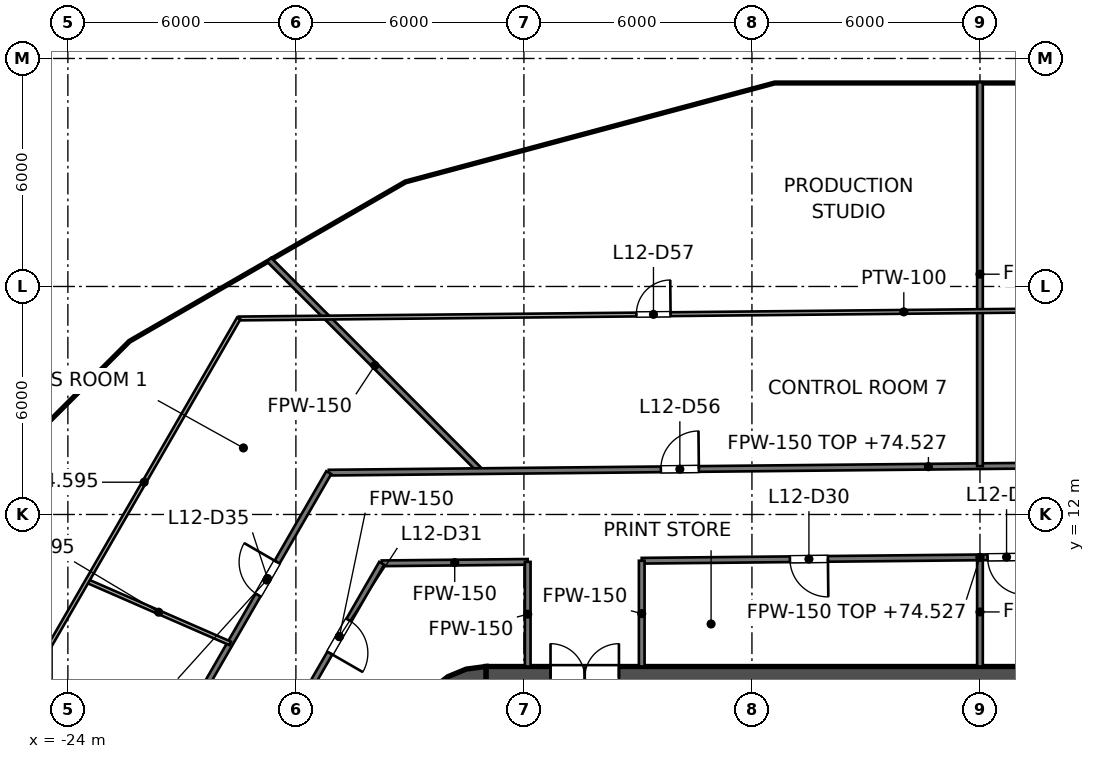
"""IFC4 building model, lengths in metres.
Left out: names, types, materials, properties, quantities, classifications, styles, units other than length and angle.
Written with IfcOpenShell. Run it as: python <this file> out.ifc"""

import sys

from ifc_helpers import new_model, si_unit, direction, frame, frame_2d, origin, place, context, subcontext, project, spatial, polyline, rectangle, outline, extrude, element, fill, save


model = new_model("IFC4")
c1 = context("Model", 3, precision=1e-05, world=origin(), true_north=direction((0.0, 1.0)))
c2 = subcontext(c1, "Body", "Model", "MODEL_VIEW")
j1 = project(units=[si_unit("LENGTHUNIT", "METRE"), si_unit("PLANEANGLEUNIT", "RADIAN")], contexts=[c1])
p1 = place(None, origin())
s1 = spatial("IfcSite", under=j1, at=p1, CompositionType="ELEMENT")
p2 = place(p1, origin())
s2 = spatial("IfcBuilding", under=s1, at=p2, CompositionType="ELEMENT")
p3 = place(p2, frame((0.0, 0.0, 71.4)))
s3 = spatial("IfcBuildingStorey", under=s2, at=p3, CompositionType="ELEMENT", Elevation=71.4)
p4 = place(p3, frame((-13.0, 7.7, 0.0), z_axis=(0.0, 0.0, 1.0), x_axis=(1.0, 0.0, 0.0)))
e1 = element("IfcWall", 1, at=p4, inside=s3, PredefinedType="SHEAR", context=c2, shape_type="SweptSolid", body=[
    extrude(rectangle(XDim=26.0, YDim=0.6, at=frame_2d((13.0, 0.0))), origin(), (0.0, 0.0, 1.0), 4.2),
])
p5 = place(p4, frame((1.7, 0.0, 0.0)))
e2 = element("IfcOpeningElement", 2, at=p5, cuts=e1, PredefinedType="OPENING", context=c2, shape_type="SweptSolid", body=[
    extrude(rectangle(XDim=1.8, YDim=2.1, at=frame_2d((0.9, 1.05))), frame((0.0, 0.3, 0.0), z_axis=(0.0, -1.0, 0.0), x_axis=(1.0, 0.0, 0.0)), (0.0, 0.0, 1.0), 0.6),
])
p6 = place(p4, frame((22.5, 0.0, 0.0)))
e3 = element("IfcOpeningElement", 3, at=p6, cuts=e1, PredefinedType="OPENING", context=c2, shape_type="SweptSolid", body=[
    extrude(rectangle(XDim=1.8, YDim=2.1, at=frame_2d((0.9, 1.05))), frame((0.0, 0.3, 0.0), z_axis=(0.0, -1.0, 0.0), x_axis=(1.0, 0.0, 0.0)), (0.0, 0.0, 1.0), 0.6),
])
p7 = place(p3, origin())
e4 = element("IfcWall", 4, at=p7, inside=s3, PredefinedType="SHEAR", context=c2, shape_type="SweptSolid", body=[
    extrude(outline(polyline([(-15.0, 6.0), (-14.395, 6.0), (-14.347, 6.361), (-14.208, 6.698), (-13.986, 6.986), (-13.698, 7.208), (-13.361, 7.347), (-13.0, 7.395), (-13.0, 8.0), (-13.518, 7.932), (-14.0, 7.732), (-14.414, 7.414), (-14.732, 7.0), (-14.932, 6.518), (-15.0, 6.0)])), origin(), (0.0, 0.0, 1.0), 4.2),
])
p8 = place(p3, frame((-18.703, 18.703, 0.0), z_axis=(0.0, 0.0, 1.0), x_axis=(0.707106781187, -0.707106781187, 0.0)))
e5 = element("IfcWall", 5, at=p8, inside=s3, PredefinedType="PARTITIONING", context=c2, shape_type="SweptSolid", body=[
    extrude(rectangle(XDim=7.865, YDim=0.15, at=frame_2d((3.933, 0.0))), origin(), (0.0, 0.0, 1.0), 3.195),
])
p9 = place(p3, frame((-15.742, 10.715, 0.0), z_axis=(0.0, 0.0, 1.0), x_axis=(0.999950870391, 0.009912456998, 0.0)))
e6 = element("IfcWall", 6, at=p9, inside=s3, PredefinedType="PARTITIONING", context=c2, shape_type="SweptSolid", body=[
    extrude(rectangle(XDim=3.842, YDim=0.15, at=frame_2d((1.921, 0.0))), origin(), (0.0, 0.0, 1.0), 3.195),
])
p10 = place(p3, frame((-8.9, 10.783, 0.0), z_axis=(0.0, 0.0, 1.0), x_axis=(0.999950697987, 0.009929833562, 0.0)))
e7 = element("IfcWall", 7, at=p10, inside=s3, PredefinedType="PARTITIONING", context=c2, shape_type="SweptSolid", body=[
    extrude(rectangle(XDim=17.801, YDim=0.15, at=frame_2d((8.9, 0.0))), origin(), (0.0, 0.0, 1.0), 3.127),
])
p11 = place(p10, frame((9.1, 0.0, 0.0)))
e8 = element("IfcOpeningElement", 8, at=p11, cuts=e7, PredefinedType="OPENING", context=c2, shape_type="SweptSolid", body=[
    extrude(rectangle(XDim=1.0, YDim=2.1, at=frame_2d((0.5, 1.05))), frame((0.0, 0.075, 0.0), z_axis=(0.0, -1.0, 0.0), x_axis=(1.0, 0.0, 0.0)), (0.0, 0.0, 1.0), 0.15),
])
p12 = place(p10, frame((3.9, 0.0, 0.0)))
e9 = element("IfcOpeningElement", 9, at=p12, cuts=e7, PredefinedType="OPENING", context=c2, shape_type="SweptSolid", body=[
    extrude(rectangle(XDim=1.0, YDim=2.1, at=frame_2d((0.5, 1.05))), frame((0.0, 0.075, 0.0), z_axis=(0.0, -1.0, 0.0), x_axis=(1.0, 0.0, 0.0)), (0.0, 0.0, 1.0), 0.15),
])
p13 = place(p3, frame((-17.135, 13.101, 0.0), z_axis=(0.0, 0.0, 1.0), x_axis=(0.999950742047, 0.009925395736, 0.0)))
e10 = element("IfcWall", 10, at=p13, inside=s3, PredefinedType="PARTITIONING", context=c2, shape_type="SweptSolid", body=[
    extrude(rectangle(XDim=31.559, YDim=0.15, at=frame_2d((15.779, 0.0))), origin(), (0.0, 0.0, 1.0), 3.127),
])
p14 = place(p13, frame((21.441, 0.0, 0.0)))
e11 = element("IfcOpeningElement", 11, at=p14, cuts=e10, PredefinedType="OPENING", context=c2, shape_type="SweptSolid", body=[
    extrude(rectangle(XDim=1.0, YDim=2.1, at=frame_2d((0.5, 1.05))), frame((0.0, 0.075, 0.0), z_axis=(0.0, -1.0, 0.0), x_axis=(1.0, 0.0, 0.0)), (0.0, 0.0, 1.0), 0.15),
])
p15 = place(p13, frame((8.739, 0.0, 0.0)))
e12 = element("IfcOpeningElement", 12, at=p15, cuts=e10, PredefinedType="OPENING", context=c2, shape_type="SweptSolid", body=[
    extrude(rectangle(XDim=1.0, YDim=2.1, at=frame_2d((0.5, 1.05))), frame((0.0, 0.075, 0.0), z_axis=(0.0, -1.0, 0.0), x_axis=(1.0, 0.0, 0.0)), (0.0, 0.0, 1.0), 0.15),
])
p16 = place(p3, frame((-17.968, 6.86, 0.0), z_axis=(0.0, 0.0, 1.0), x_axis=(0.499985160367, 0.866033971281, 0.0)))
e13 = element("IfcWall", 13, at=p16, inside=s3, PredefinedType="PARTITIONING", context=c2, shape_type="SweptSolid", body=[
    extrude(rectangle(XDim=4.451, YDim=0.15, at=frame_2d((2.226, 0.0))), origin(), (0.0, 0.0, 1.0), 3.195),
])
p17 = place(p16, frame((1.724, 0.0, 0.0)))
e14 = element("IfcOpeningElement", 14, at=p17, cuts=e13, PredefinedType="OPENING", context=c2, shape_type="SweptSolid", body=[
    extrude(rectangle(XDim=1.0, YDim=2.1, at=frame_2d((0.5, 1.05))), frame((0.0, 0.075, 0.0), z_axis=(0.0, -1.0, 0.0), x_axis=(1.0, 0.0, 0.0)), (0.0, 0.0, 1.0), 0.15),
])
p18 = place(p3, frame((-20.4, 7.447, 0.0), z_axis=(0.0, 0.0, 1.0), x_axis=(0.499959831567, 0.866048593798, 0.0)))
e15 = element("IfcWall", 15, at=p18, inside=s3, PredefinedType="PARTITIONING", context=c2, shape_type="SweptSolid", body=[
    extrude(rectangle(XDim=6.529, YDim=0.15, at=frame_2d((3.264, 0.0))), origin(), (0.0, 0.0, 1.0), 3.195),
])
p19 = place(p18, frame((2.811, 0.0, 0.0)))
e16 = element("IfcOpeningElement", 16, at=p19, cuts=e15, PredefinedType="OPENING", context=c2, shape_type="SweptSolid", body=[
    extrude(rectangle(XDim=1.0, YDim=2.1, at=frame_2d((0.5, 1.05))), frame((0.0, 0.075, 0.0), z_axis=(0.0, -1.0, 0.0), x_axis=(1.0, 0.0, 0.0)), (0.0, 0.0, 1.0), 0.15),
])
p20 = place(p3, frame((0.0, 8.0, 0.0), z_axis=(0.0, 0.0, 1.0), x_axis=(0.0, 1.0, 0.0)))
e17 = element("IfcWall", 17, at=p20, inside=s3, PredefinedType="PARTITIONING", context=c2, shape_type="SweptSolid", body=[
    extrude(rectangle(XDim=2.871, YDim=0.15, at=frame_2d((1.436, 0.0))), origin(), (0.0, 0.0, 1.0), 3.195),
])
p21 = place(p3, frame((0.0, 13.271, 0.0), z_axis=(0.0, 0.0, 1.0), x_axis=(0.0, 1.0, 0.0)))
e18 = element("IfcWall", 18, at=p21, inside=s3, PredefinedType="PARTITIONING", context=c2, shape_type="SweptSolid", body=[
    extrude(rectangle(XDim=10.104, YDim=0.15, at=frame_2d((5.052, 0.0))), origin(), (0.0, 0.0, 1.0), 3.195),
])
p22 = place(p3, frame((-8.9, 8.0, 0.0), z_axis=(0.0, 0.0, 1.0), x_axis=(0.0, 1.0, 0.0)))
e19 = element("IfcWall", 19, at=p22, inside=s3, PredefinedType="PARTITIONING", context=c2, shape_type="SweptSolid", body=[
    extrude(rectangle(XDim=2.783, YDim=0.15, at=frame_2d((1.392, 0.0))), origin(), (0.0, 0.0, 1.0), 3.195),
])
p23 = place(p3, frame((-11.9, 8.0, 0.0), z_axis=(0.0, 0.0, 1.0), x_axis=(0.0, 1.0, 0.0)))
e20 = element("IfcWall", 20, at=p23, inside=s3, PredefinedType="PARTITIONING", context=c2, shape_type="SweptSolid", body=[
    extrude(rectangle(XDim=2.753, YDim=0.15, at=frame_2d((1.376, 0.0))), origin(), (0.0, 0.0, 1.0), 3.195),
])
p24 = place(p3, frame((-23.493, 10.25, 0.0), z_axis=(0.0, 0.0, 1.0), x_axis=(0.916532244419, -0.399960804254, 0.0)))
e21 = element("IfcWall", 21, at=p24, inside=s3, PredefinedType="PARTITIONING", context=c2, shape_type="SweptSolid", body=[
    extrude(rectangle(XDim=4.106, YDim=0.1, at=frame_2d((2.053, 0.0))), origin(), (0.0, 0.0, 1.0), 3.195),
])
p25 = place(p3, frame((-19.504, 17.158, 0.0), z_axis=(0.0, 0.0, 1.0), x_axis=(0.999950671051, 0.009932545728, 0.0)))
e22 = element("IfcWall", 22, at=p25, inside=s3, PredefinedType="PARTITIONING", context=c2, shape_type="SweptSolid", body=[
    extrude(rectangle(XDim=35.002, YDim=0.1, at=frame_2d((17.501, 0.0))), origin(), (0.0, 0.0, 1.0), 3.127),
])
p26 = place(p25, frame((26.753, 0.0, 0.0)))
e23 = element("IfcOpeningElement", 23, at=p26, cuts=e22, PredefinedType="OPENING", context=c2, shape_type="SweptSolid", body=[
    extrude(rectangle(XDim=0.9, YDim=2.1, at=frame_2d((0.45, 1.05))), frame((0.0, 0.05, 0.0), z_axis=(0.0, -1.0, 0.0), x_axis=(1.0, 0.0, 0.0)), (0.0, 0.0, 1.0), 0.1),
])
p27 = place(p25, frame((10.463, 0.0, 0.0)))
e24 = element("IfcOpeningElement", 24, at=p27, cuts=e22, PredefinedType="OPENING", context=c2, shape_type="SweptSolid", body=[
    extrude(rectangle(XDim=0.9, YDim=2.1, at=frame_2d((0.45, 1.05))), frame((0.0, 0.05, 0.0), z_axis=(0.0, -1.0, 0.0), x_axis=(1.0, 0.0, 0.0)), (0.0, 0.0, 1.0), 0.1),
])
p28 = place(p3, frame((-24.48, 8.54, 0.0), z_axis=(0.0, 0.0, 1.0), x_axis=(0.499991453095, 0.866030338286, 0.0)))
e25 = element("IfcWall", 25, at=p28, inside=s3, PredefinedType="PARTITIONING", context=c2, shape_type="SweptSolid", body=[
    extrude(rectangle(XDim=9.951, YDim=0.1, at=frame_2d((4.976, 0.0))), origin(), (0.0, 0.0, 1.0), 3.195),
])
p29 = place(p5, origin())
e26 = element("IfcDoor", 26, at=p29, inside=s3, OperationType="DOUBLE_DOOR_SINGLE_SWING", PredefinedType="DOOR", context=c2, shape_type="SweptSolid", body=[
    extrude(rectangle(XDim=1.8, YDim=2.1, at=frame_2d((0.9, 1.05))), frame((0.0, 0.025, 0.0), z_axis=(0.0, -1.0, 0.0), x_axis=(1.0, 0.0, 0.0)), (0.0, 0.0, 1.0), 0.05),
])
fill(e2, e26)
p30 = place(p11, origin())
e27 = element("IfcDoor", 27, at=p30, inside=s3, OperationType="SINGLE_SWING_RIGHT", PredefinedType="DOOR", context=c2, shape_type="SweptSolid", body=[
    extrude(rectangle(XDim=1.0, YDim=2.1, at=frame_2d((0.5, 1.05))), frame((0.0, 0.025, 0.0), z_axis=(0.0, -1.0, 0.0), x_axis=(1.0, 0.0, 0.0)), (0.0, 0.0, 1.0), 0.05),
])
fill(e8, e27)
p31 = place(p12, origin())
e28 = element("IfcDoor", 28, at=p31, inside=s3, OperationType="SINGLE_SWING_RIGHT", PredefinedType="DOOR", context=c2, shape_type="SweptSolid", body=[
    extrude(rectangle(XDim=1.0, YDim=2.1, at=frame_2d((0.5, 1.05))), frame((0.0, 0.025, 0.0), z_axis=(0.0, -1.0, 0.0), x_axis=(1.0, 0.0, 0.0)), (0.0, 0.0, 1.0), 0.05),
])
fill(e9, e28)
p32 = place(p17, origin())
e29 = element("IfcDoor", 29, at=p32, inside=s3, OperationType="SINGLE_SWING_LEFT", PredefinedType="DOOR", context=c2, shape_type="SweptSolid", body=[
    extrude(rectangle(XDim=1.0, YDim=2.1, at=frame_2d((0.5, 1.05))), frame((0.0, 0.025, 0.0), z_axis=(0.0, -1.0, 0.0), x_axis=(1.0, 0.0, 0.0)), (0.0, 0.0, 1.0), 0.05),
])
fill(e14, e29)
p33 = place(p19, origin())
e30 = element("IfcDoor", 30, at=p33, inside=s3, OperationType="SINGLE_SWING_RIGHT", PredefinedType="DOOR", context=c2, shape_type="SweptSolid", body=[
    extrude(rectangle(XDim=1.0, YDim=2.1, at=frame_2d((0.5, 1.05))), frame((0.0, 0.025, 0.0), z_axis=(0.0, -1.0, 0.0), x_axis=(1.0, 0.0, 0.0)), (0.0, 0.0, 1.0), 0.05),
])
fill(e16, e30)
p34 = place(p15, origin())
e31 = element("IfcDoor", 31, at=p34, inside=s3, OperationType="SINGLE_SWING_RIGHT", PredefinedType="DOOR", context=c2, shape_type="SweptSolid", body=[
    extrude(rectangle(XDim=1.0, YDim=2.1, at=frame_2d((0.5, 1.05))), frame((0.0, 0.025, 0.0), z_axis=(0.0, -1.0, 0.0), x_axis=(1.0, 0.0, 0.0)), (0.0, 0.0, 1.0), 0.05),
])
fill(e12, e31)
p35 = place(p27, origin())
e32 = element("IfcDoor", 32, at=p35, inside=s3, OperationType="SINGLE_SWING_RIGHT", PredefinedType="DOOR", context=c2, shape_type="SweptSolid", body=[
    extrude(rectangle(XDim=0.9, YDim=2.1, at=frame_2d((0.45, 1.05))), frame((0.0, 0.025, 0.0), z_axis=(0.0, -1.0, 0.0), x_axis=(1.0, 0.0, 0.0)), (0.0, 0.0, 1.0), 0.05),
])
fill(e24, e32)
save(model, sys.argv[1])
